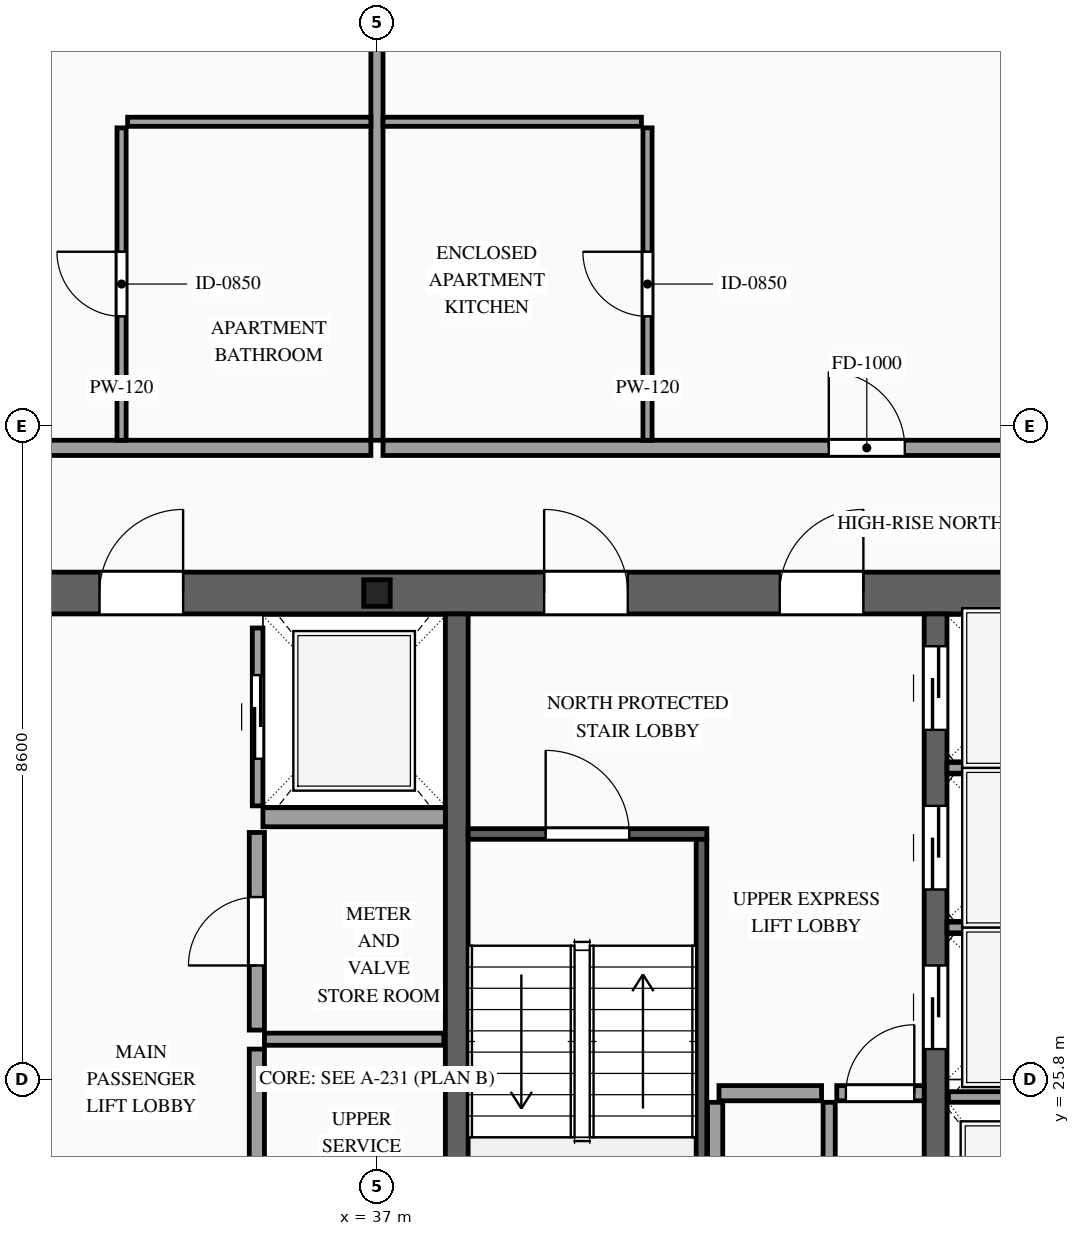
"""IFC4 building model, lengths in metres.
Left out: names, types, materials, properties, quantities, classifications, styles, units other than length and angle.
Written with IfcOpenShell. Run it as: python <this file> out.ifc"""

import sys

from ifc_helpers import new_model, si_unit, direction, frame, frame_2d, origin, origin_2d, place, context, subcontext, project, spatial, rectangle, i_section, extrude, source, transform, mapped, element, fill, save


model = new_model("IFC4")
c1 = context("Model", 3, precision=1e-05, world=origin(), true_north=direction((0.0, 1.0)))
c2 = subcontext(c1, "Body", "Model", "MODEL_VIEW")
j1 = project(units=[si_unit("LENGTHUNIT", "METRE"), si_unit("PLANEANGLEUNIT", "RADIAN")], contexts=[c1])
p1 = place(None, origin())
s1 = spatial("IfcSite", under=j1, at=p1, CompositionType="ELEMENT")
p2 = place(p1, origin())
s2 = spatial("IfcBuilding", under=s1, at=p2, CompositionType="ELEMENT")
p3 = place(p2, frame((0.0, 0.0, 275.1)))
s3 = spatial("IfcBuildingStorey", under=s2, at=p3, CompositionType="ELEMENT", Elevation=275.1)
p4 = place(p3, frame((23.525, 32.2, 0.0), z_axis=(0.0, 0.0, 1.0), x_axis=(1.0, 0.0, 0.0)))
e1 = element("IfcWall", 1, at=p4, inside=s3, PredefinedType="SHEAR", context=c2, shape_type="SweptSolid", body=[
    extrude(rectangle(XDim=26.95, YDim=0.55, at=frame_2d((13.475, 0.0))), origin(), (0.0, 0.0, 1.0), 3.5),
])
p5 = place(p4, frame((4.545, 0.0, 0.0)))
e2 = element("IfcOpeningElement", 2, at=p5, cuts=e1, PredefinedType="OPENING", context=c2, shape_type="SweptSolid", body=[
    extrude(rectangle(XDim=0.9, YDim=2.15, at=frame_2d((0.45, 1.075))), frame((0.0, 0.29, 0.0), z_axis=(0.0, -1.0, 0.0), x_axis=(1.0, 0.0, 0.0)), (0.0, 0.0, 1.0), 0.58),
])
p6 = place(p4, frame((9.825, 0.0, 0.0)))
e3 = element("IfcOpeningElement", 3, at=p6, cuts=e1, PredefinedType="OPENING", context=c2, shape_type="SweptSolid", body=[
    extrude(rectangle(XDim=1.1, YDim=2.2, at=frame_2d((0.55, 1.1))), frame((0.0, 0.29, 0.0), z_axis=(0.0, -1.0, 0.0), x_axis=(1.0, 0.0, 0.0)), (0.0, 0.0, 1.0), 0.58),
])
p7 = place(p4, frame((15.675, 0.0, 0.0)))
e4 = element("IfcOpeningElement", 4, at=p7, cuts=e1, PredefinedType="OPENING", context=c2, shape_type="SweptSolid", body=[
    extrude(rectangle(XDim=1.1, YDim=2.2, at=frame_2d((0.55, 1.1))), frame((0.0, 0.29, 0.0), z_axis=(0.0, -1.0, 0.0), x_axis=(1.0, 0.0, 0.0)), (0.0, 0.0, 1.0), 0.58),
])
p8 = place(p4, frame((18.775, 0.0, 0.0)))
e5 = element("IfcOpeningElement", 5, at=p8, cuts=e1, PredefinedType="OPENING", context=c2, shape_type="SweptSolid", body=[
    extrude(rectangle(XDim=1.1, YDim=2.2, at=frame_2d((0.55, 1.1))), frame((0.0, 0.29, 0.0), z_axis=(0.0, -1.0, 0.0), x_axis=(1.0, 0.0, 0.0)), (0.0, 0.0, 1.0), 0.58),
])
m1 = source(origin(), c2, "Body", "SweptSolid", [
    extrude(rectangle(XDim=12.25, YDim=0.3, at=frame_2d((6.125, 0.0))), origin(), (0.0, 0.0, 1.0), 3.5),
])
p9 = place(p3, frame((38.05, 19.675, 0.0), z_axis=(0.0, 0.0, 1.0), x_axis=(0.0, 1.0, 0.0)))
e6 = element("IfcWall", 6, at=p9, inside=s3, PredefinedType="SOLIDWALL", context=c2, shape_type="MappedRepresentation", body=[
    mapped(m1, transform((0.0, 0.0, 0.0), scale=1.0)),
])
p10 = place(p3, frame((44.35, 19.675, 0.0), z_axis=(0.0, 0.0, 1.0), x_axis=(0.0, 1.0, 0.0)))
e7 = element("IfcWall", 7, at=p10, inside=s3, PredefinedType="SOLIDWALL", context=c2, shape_type="SweptSolid", body=[
    extrude(rectangle(XDim=12.25, YDim=0.3, at=frame_2d((6.125, 0.0))), origin(), (0.0, 0.0, 1.0), 3.5),
])
p11 = place(p10, frame((6.525, 0.0, 0.0)))
e8 = element("IfcOpeningElement", 8, at=p11, cuts=e7, PredefinedType="OPENING", context=c2, shape_type="SweptSolid", body=[
    extrude(rectangle(XDim=1.1, YDim=2.2, at=frame_2d((0.55, 1.1))), frame((0.0, 0.165, 0.0), z_axis=(0.0, -1.0, 0.0), x_axis=(1.0, 0.0, 0.0)), (0.0, 0.0, 1.0), 0.33),
])
p12 = place(p10, frame((8.625, 0.0, 0.0)))
e9 = element("IfcOpeningElement", 9, at=p12, cuts=e7, PredefinedType="OPENING", context=c2, shape_type="SweptSolid", body=[
    extrude(rectangle(XDim=1.1, YDim=2.2, at=frame_2d((0.55, 1.1))), frame((0.0, 0.165, 0.0), z_axis=(0.0, -1.0, 0.0), x_axis=(1.0, 0.0, 0.0)), (0.0, 0.0, 1.0), 0.33),
])
p13 = place(p10, frame((10.725, 0.0, 0.0)))
e10 = element("IfcOpeningElement", 10, at=p13, cuts=e7, PredefinedType="OPENING", context=c2, shape_type="SweptSolid", body=[
    extrude(rectangle(XDim=1.1, YDim=2.2, at=frame_2d((0.55, 1.1))), frame((0.0, 0.165, 0.0), z_axis=(0.0, -1.0, 0.0), x_axis=(1.0, 0.0, 0.0)), (0.0, 0.0, 1.0), 0.33),
])
m2 = source(origin(), c2, "Body", "SweptSolid", [
    extrude(i_section(OverallWidth=0.35, OverallDepth=0.35, WebThickness=0.012, FlangeThickness=0.019, at=origin_2d()), origin(), (0.0, 0.0, 1.0), 3.5),
])
p14 = place(p3, frame((37.0, 32.2, 0.0), z_axis=(0.0, 0.0, 1.0), x_axis=(1.0, 0.0, 0.0)))
e11 = element("IfcColumn", 11, at=p14, inside=s3, PredefinedType="COLUMN", context=c2, shape_type="MappedRepresentation", body=[
    mapped(m2, transform((0.0, 0.0, 0.0), scale=1.0)),
])
m3 = source(origin(), c2, "Body", "SweptSolid", [
    extrude(rectangle(XDim=1.92, YDim=0.14, at=frame_2d((0.96, 0.0))), origin(), (0.0, 0.0, 1.0), 3.28),
])
p15 = place(p3, frame((44.52, 25.57, 0.0), z_axis=(0.0, 0.0, 1.0), x_axis=(1.0, 0.0, 0.0)))
e12 = element("IfcWall", 12, at=p15, inside=s3, PredefinedType="SOLIDWALL", context=c2, shape_type="MappedRepresentation", body=[
    mapped(m3, transform((0.0, 0.0, 0.0), scale=1.0)),
])
p16 = place(p3, frame((35.43, 29.4, 0.0), z_axis=(0.0, 0.0, 1.0), x_axis=(0.0, 1.0, 0.0)))
e13 = element("IfcWall", 13, at=p16, inside=s3, PredefinedType="SOLIDWALL", context=c2, shape_type="SweptSolid", body=[
    extrude(rectangle(XDim=2.34, YDim=0.14, at=frame_2d((1.17, 0.0))), origin(), (0.0, 0.0, 1.0), 3.28),
])
p17 = place(p16, frame((0.62, 0.0, 0.0)))
e14 = element("IfcOpeningElement", 14, at=p17, cuts=e13, PredefinedType="OPENING", context=c2, shape_type="SweptSolid", body=[
    extrude(rectangle(XDim=1.1, YDim=2.2, at=frame_2d((0.55, 1.1))), frame((0.0, 0.085, 0.0), z_axis=(0.0, -1.0, 0.0), x_axis=(1.0, 0.0, 0.0)), (0.0, 0.0, 1.0), 0.17),
])
m4 = source(origin(), c2, "Body", "SweptSolid", [
    extrude(rectangle(XDim=2.4, YDim=0.25, at=frame_2d((1.2, 0.0))), origin(), (0.0, 0.0, 1.0), 3.28),
])
p18 = place(p3, frame((35.5, 29.25, 0.0), z_axis=(0.0, 0.0, 1.0), x_axis=(1.0, 0.0, 0.0)))
e15 = element("IfcWall", 15, at=p18, inside=s3, PredefinedType="SOLIDWALL", context=c2, shape_type="MappedRepresentation", body=[
    mapped(m4, transform((0.0, 0.0, 0.0), scale=1.0)),
])
m5 = source(origin(), c2, "Body", "SweptSolid", [
    extrude(rectangle(XDim=2.0, YDim=0.14, at=frame_2d((1.0, 0.0))), origin(), (0.0, 0.0, 1.0), 3.28),
])
for number, where, z_axis, x_axis in (
    (16, (44.5, 27.8, 0.0), (0.0, 0.0, 1.0), (1.0, 0.0, 0.0)),
    (17, (44.5, 29.9, 0.0), (0.0, 0.0, 1.0), (1.0, 0.0, 0.0)),
):
    element("IfcWall", number, at=place(p3, frame(where, z_axis=z_axis, x_axis=x_axis)), inside=s3, PredefinedType="SOLIDWALL", context=c2, shape_type="MappedRepresentation", body=[
        mapped(m5, transform((0.0, 0.0, 0.0), scale=1.0)),
    ])
p19 = place(p3, frame((38.2, 29.03, 0.0), z_axis=(0.0, 0.0, 1.0), x_axis=(1.0, 0.0, 0.0)))
e18 = element("IfcWall", 18, at=p19, inside=s3, PredefinedType="SOLIDWALL", context=c2, shape_type="SweptSolid", body=[
    extrude(rectangle(XDim=3.14, YDim=0.14, at=frame_2d((1.57, 0.0))), origin(), (0.0, 0.0, 1.0), 3.28),
])
p20 = place(p19, frame((1.02, 0.0, 0.0)))
e19 = element("IfcOpeningElement", 19, at=p20, cuts=e18, PredefinedType="OPENING", context=c2, shape_type="SweptSolid", body=[
    extrude(rectangle(XDim=1.1, YDim=2.2, at=frame_2d((0.55, 1.1))), frame((0.0, 0.085, 0.0), z_axis=(0.0, -1.0, 0.0), x_axis=(1.0, 0.0, 0.0)), (0.0, 0.0, 1.0), 0.17),
])
m6 = source(origin(), c2, "Body", "SweptSolid", [
    extrude(rectangle(XDim=8.94, YDim=0.14, at=frame_2d((4.47, 0.0))), origin(), (0.0, 0.0, 1.0), 3.28),
])
p21 = place(p3, frame((41.27, 20.02, 0.0), z_axis=(0.0, 0.0, 1.0), x_axis=(0.0, 1.0, 0.0)))
e20 = element("IfcWall", 20, at=p21, inside=s3, PredefinedType="SOLIDWALL", context=c2, shape_type="MappedRepresentation", body=[
    mapped(m6, transform((0.0, 0.0, 0.0), scale=1.0)),
])
p22 = place(p3, frame((35.42, 19.86, 0.0), z_axis=(0.0, 0.0, 1.0), x_axis=(0.0, 1.0, 0.0)))
e21 = element("IfcWall", 21, at=p22, inside=s3, PredefinedType="PARTITIONING", context=c2, shape_type="SweptSolid", body=[
    extrude(rectangle(XDim=6.34, YDim=0.2, at=frame_2d((3.17, 0.0))), origin(), (0.0, 0.0, 1.0), 3.28),
])
p23 = place(p22, frame((2.72, 0.0, 0.0)))
e22 = element("IfcOpeningElement", 22, at=p23, cuts=e21, PredefinedType="OPENING", context=c2, shape_type="SweptSolid", body=[
    extrude(rectangle(XDim=0.9, YDim=2.15, at=frame_2d((0.45, 1.075))), frame((0.0, 0.115, 0.0), z_axis=(0.0, -1.0, 0.0), x_axis=(1.0, 0.0, 0.0)), (0.0, 0.0, 1.0), 0.23),
])
p24 = place(p3, frame((35.42, 26.45, 0.0), z_axis=(0.0, 0.0, 1.0), x_axis=(0.0, 1.0, 0.0)))
e23 = element("IfcWall", 23, at=p24, inside=s3, PredefinedType="PARTITIONING", context=c2, shape_type="SweptSolid", body=[
    extrude(rectangle(XDim=2.6, YDim=0.2, at=frame_2d((1.3, 0.0))), origin(), (0.0, 0.0, 1.0), 3.28),
])
p25 = place(p24, frame((0.85, 0.0, 0.0)))
e24 = element("IfcOpeningElement", 24, at=p25, cuts=e23, PredefinedType="OPENING", context=c2, shape_type="SweptSolid", body=[
    extrude(rectangle(XDim=0.9, YDim=2.15, at=frame_2d((0.45, 1.075))), frame((0.0, 0.115, 0.0), z_axis=(0.0, -1.0, 0.0), x_axis=(1.0, 0.0, 0.0)), (0.0, 0.0, 1.0), 0.23),
])
m7 = source(origin(), c2, "Body", "SweptSolid", [
    extrude(rectangle(XDim=2.36, YDim=0.16, at=frame_2d((1.18, 0.0))), origin(), (0.0, 0.0, 1.0), 3.28),
])
p26 = place(p3, frame((35.52, 26.33, 0.0), z_axis=(0.0, 0.0, 1.0), x_axis=(1.0, 0.0, 0.0)))
e25 = element("IfcWall", 25, at=p26, inside=s3, PredefinedType="PARTITIONING", context=c2, shape_type="MappedRepresentation", body=[
    mapped(m7, transform((0.0, 0.0, 0.0), scale=1.0)),
])
m8 = source(origin(), c2, "Body", "SweptSolid", [
    extrude(rectangle(XDim=6.06, YDim=0.2, at=frame_2d((3.03, 0.0))), origin(), (0.0, 0.0, 1.0), 3.28),
])
p27 = place(p3, frame((41.45, 19.44, 0.0), z_axis=(0.0, 0.0, 1.0), x_axis=(0.0, 1.0, 0.0)))
e26 = element("IfcWall", 26, at=p27, inside=s3, PredefinedType="PARTITIONING", context=c2, shape_type="MappedRepresentation", body=[
    mapped(m8, transform((0.0, 0.0, 0.0), scale=1.0)),
])
m9 = source(origin(), c2, "Body", "SweptSolid", [
    extrude(rectangle(XDim=1.35, YDim=0.2, at=frame_2d((0.675, 0.0))), origin(), (0.0, 0.0, 1.0), 3.28),
])
p28 = place(p3, frame((41.5, 25.62, 0.0), z_axis=(0.0, 0.0, 1.0), x_axis=(1.0, 0.0, 0.0)))
e27 = element("IfcWall", 27, at=p28, inside=s3, PredefinedType="PARTITIONING", context=c2, shape_type="MappedRepresentation", body=[
    mapped(m9, transform((0.0, 0.0, 0.0), scale=1.0)),
])
m10 = source(origin(), c2, "Body", "SweptSolid", [
    extrude(rectangle(XDim=4.06, YDim=0.16, at=frame_2d((2.03, 0.0))), origin(), (0.0, 0.0, 1.0), 3.28),
])
p29 = place(p3, frame((42.95, 21.44, 0.0), z_axis=(0.0, 0.0, 1.0), x_axis=(0.0, 1.0, 0.0)))
e28 = element("IfcWall", 28, at=p29, inside=s3, PredefinedType="PARTITIONING", context=c2, shape_type="MappedRepresentation", body=[
    mapped(m10, transform((0.0, 0.0, 0.0), scale=1.0)),
])
p30 = place(p3, frame((43.05, 25.62, 0.0), z_axis=(0.0, 0.0, 1.0), x_axis=(1.0, 0.0, 0.0)))
e29 = element("IfcWall", 29, at=p30, inside=s3, PredefinedType="PARTITIONING", context=c2, shape_type="SweptSolid", body=[
    extrude(rectangle(XDim=1.15, YDim=0.2, at=frame_2d((0.575, 0.0))), origin(), (0.0, 0.0, 1.0), 3.28),
])
p31 = place(p30, frame((0.12, 0.0, 0.0)))
e30 = element("IfcOpeningElement", 30, at=p31, cuts=e29, PredefinedType="OPENING", context=c2, shape_type="SweptSolid", body=[
    extrude(rectangle(XDim=0.9, YDim=2.15, at=frame_2d((0.45, 1.075))), frame((0.0, 0.115, 0.0), z_axis=(0.0, -1.0, 0.0), x_axis=(1.0, 0.0, 0.0)), (0.0, 0.0, 1.0), 0.23),
])
p32 = place(p3, frame((19.44, 34.11, 0.0), z_axis=(0.0, 0.0, 1.0), x_axis=(1.0, 0.0, 0.0)))
e31 = element("IfcWall", 31, at=p32, inside=s3, PredefinedType="PARTITIONING", context=c2, shape_type="SweptSolid", body=[
    extrude(rectangle(XDim=17.48, YDim=0.2, at=frame_2d((8.74, 0.0))), origin(), (0.0, 0.0, 1.0), 3.28),
])
p33 = place(p32, frame((8.34, 0.0, 0.0)))
e32 = element("IfcOpeningElement", 32, at=p33, cuts=e31, PredefinedType="OPENING", context=c2, shape_type="SweptSolid", body=[
    extrude(rectangle(XDim=1.0, YDim=2.2, at=frame_2d((0.5, 1.1))), frame((0.0, 0.115, 0.0), z_axis=(0.0, -1.0, 0.0), x_axis=(1.0, 0.0, 0.0)), (0.0, 0.0, 1.0), 0.23),
])
m11 = source(origin(), c2, "Body", "SweptSolid", [
    extrude(rectangle(XDim=12.04, YDim=0.16, at=frame_2d((6.02, 0.0))), origin(), (0.0, 0.0, 1.0), 2.787),
])
p34 = place(p3, frame((37.0, 34.21, 0.0), z_axis=(0.0, 0.0, 1.0), x_axis=(0.0, 1.0, 0.0)))
e33 = element("IfcWall", 33, at=p34, inside=s3, PredefinedType="PARTITIONING", context=c2, shape_type="MappedRepresentation", body=[
    mapped(m11, transform((0.0, 0.0, 0.0), scale=1.0)),
])
m12 = source(origin(), c2, "Body", "SweptSolid", [
    extrude(rectangle(XDim=3.2, YDim=0.12, at=frame_2d((1.6, 0.0))), origin(), (0.0, 0.0, 1.0), 3.28),
])
p35 = place(p3, frame((33.72, 38.4, 0.0), z_axis=(0.0, 0.0, 1.0), x_axis=(1.0, 0.0, 0.0)))
e34 = element("IfcWall", 34, at=p35, inside=s3, PredefinedType="PARTITIONING", context=c2, shape_type="MappedRepresentation", body=[
    mapped(m12, transform((0.0, 0.0, 0.0), scale=1.0)),
])
p36 = place(p3, frame((33.64, 34.21, 0.0), z_axis=(0.0, 0.0, 1.0), x_axis=(0.0, 1.0, 0.0)))
e35 = element("IfcWall", 35, at=p36, inside=s3, PredefinedType="PARTITIONING", context=c2, shape_type="SweptSolid", body=[
    extrude(rectangle(XDim=4.11, YDim=0.12, at=frame_2d((2.055, 0.0))), origin(), (0.0, 0.0, 1.0), 3.28),
])
p37 = place(p36, frame((1.63, 0.0, 0.0)))
e36 = element("IfcOpeningElement", 36, at=p37, cuts=e35, PredefinedType="OPENING", context=c2, shape_type="SweptSolid", body=[
    extrude(rectangle(XDim=0.85, YDim=2.1, at=frame_2d((0.425, 1.05))), frame((0.0, 0.075, 0.0), z_axis=(0.0, -1.0, 0.0), x_axis=(1.0, 0.0, 0.0)), (0.0, 0.0, 1.0), 0.15),
])
p38 = place(p3, frame((37.08, 34.11, 0.0), z_axis=(0.0, 0.0, 1.0), x_axis=(1.0, 0.0, 0.0)))
e37 = element("IfcWall", 37, at=p38, inside=s3, PredefinedType="PARTITIONING", context=c2, shape_type="SweptSolid", body=[
    extrude(rectangle(XDim=17.48, YDim=0.2, at=frame_2d((8.74, 0.0))), origin(), (0.0, 0.0, 1.0), 3.28),
])
p39 = place(p38, frame((5.865, 0.0, 0.0)))
e38 = element("IfcOpeningElement", 38, at=p39, cuts=e37, PredefinedType="OPENING", context=c2, shape_type="SweptSolid", body=[
    extrude(rectangle(XDim=1.0, YDim=2.2, at=frame_2d((0.5, 1.1))), frame((0.0, 0.115, 0.0), z_axis=(0.0, -1.0, 0.0), x_axis=(1.0, 0.0, 0.0)), (0.0, 0.0, 1.0), 0.23),
])
m13 = source(origin(), c2, "Body", "SweptSolid", [
    extrude(rectangle(XDim=3.4, YDim=0.12, at=frame_2d((1.7, 0.0))), origin(), (0.0, 0.0, 1.0), 3.28),
])
p40 = place(p3, frame((37.08, 38.4, 0.0), z_axis=(0.0, 0.0, 1.0), x_axis=(1.0, 0.0, 0.0)))
e39 = element("IfcWall", 39, at=p40, inside=s3, PredefinedType="PARTITIONING", context=c2, shape_type="MappedRepresentation", body=[
    mapped(m13, transform((0.0, 0.0, 0.0), scale=1.0)),
])
p41 = place(p3, frame((40.56, 34.21, 0.0), z_axis=(0.0, 0.0, 1.0), x_axis=(0.0, 1.0, 0.0)))
e40 = element("IfcWall", 40, at=p41, inside=s3, PredefinedType="PARTITIONING", context=c2, shape_type="SweptSolid", body=[
    extrude(rectangle(XDim=4.11, YDim=0.12, at=frame_2d((2.055, 0.0))), origin(), (0.0, 0.0, 1.0), 3.28),
])
p42 = place(p41, frame((1.63, 0.0, 0.0)))
e41 = element("IfcOpeningElement", 41, at=p42, cuts=e40, PredefinedType="OPENING", context=c2, shape_type="SweptSolid", body=[
    extrude(rectangle(XDim=0.85, YDim=2.1, at=frame_2d((0.425, 1.05))), frame((0.0, 0.075, 0.0), z_axis=(0.0, -1.0, 0.0), x_axis=(1.0, 0.0, 0.0)), (0.0, 0.0, 1.0), 0.15),
])
m14 = source(origin(), c2, "Body", "SweptSolid", [
    extrude(rectangle(XDim=1.1, YDim=2.2, at=frame_2d((0.55, 1.1))), frame((0.0, 0.025, 0.0), z_axis=(0.0, -1.0, 0.0), x_axis=(1.0, 0.0, 0.0)), (0.0, 0.0, 1.0), 0.05),
])
p43 = place(p17, origin())
e42 = element("IfcDoor", 42, at=p43, inside=s3, OperationType="SLIDING_TO_RIGHT", PredefinedType="DOOR", context=c2, shape_type="MappedRepresentation", body=[
    mapped(m14, transform((0.0, 0.0, 0.0), scale=1.0)),
])
fill(e14, e42)
p44 = place(p11, origin())
e43 = element("IfcDoor", 43, at=p44, inside=s3, OperationType="SLIDING_TO_LEFT", PredefinedType="DOOR", context=c2, shape_type="MappedRepresentation", body=[
    mapped(m14, transform((0.0, 0.0, 0.0), scale=1.0)),
])
fill(e8, e43)
p45 = place(p12, origin())
e44 = element("IfcDoor", 44, at=p45, inside=s3, OperationType="SLIDING_TO_RIGHT", PredefinedType="DOOR", context=c2, shape_type="MappedRepresentation", body=[
    mapped(m14, transform((0.0, 0.0, 0.0), scale=1.0)),
])
fill(e9, e44)
p46 = place(p13, origin())
e45 = element("IfcDoor", 45, at=p46, inside=s3, OperationType="SLIDING_TO_LEFT", PredefinedType="DOOR", context=c2, shape_type="MappedRepresentation", body=[
    mapped(m14, transform((0.0, 0.0, 0.0), scale=1.0)),
])
fill(e10, e45)
m15 = source(origin(), c2, "Body", "SweptSolid", [
    extrude(rectangle(XDim=1.1, YDim=2.2, at=frame_2d((0.55, 1.1))), frame((0.0, 0.025, 0.0), z_axis=(0.0, -1.0, 0.0), x_axis=(1.0, 0.0, 0.0)), (0.0, 0.0, 1.0), 0.05),
])
p47 = place(p20, origin())
e46 = element("IfcDoor", 46, at=p47, inside=s3, OperationType="SINGLE_SWING_LEFT", PredefinedType="DOOR", context=c2, shape_type="MappedRepresentation", body=[
    mapped(m15, transform((0.0, 0.0, 0.0), scale=1.0)),
])
fill(e19, e46)
p48 = place(p6, origin())
e47 = element("IfcDoor", 47, at=p48, inside=s3, OperationType="SINGLE_SWING_RIGHT", PredefinedType="DOOR", context=c2, shape_type="MappedRepresentation", body=[
    mapped(m15, transform((0.0, 0.0, 0.0), scale=1.0)),
])
fill(e3, e47)
p49 = place(p7, origin())
e48 = element("IfcDoor", 48, at=p49, inside=s3, OperationType="SINGLE_SWING_LEFT", PredefinedType="DOOR", context=c2, shape_type="MappedRepresentation", body=[
    mapped(m15, transform((0.0, 0.0, 0.0), scale=1.0)),
])
fill(e4, e48)
p50 = place(p8, origin())
e49 = element("IfcDoor", 49, at=p50, inside=s3, OperationType="SINGLE_SWING_RIGHT", PredefinedType="DOOR", context=c2, shape_type="MappedRepresentation", body=[
    mapped(m15, transform((0.0, 0.0, 0.0), scale=1.0)),
])
fill(e5, e49)
m16 = source(origin(), c2, "Body", "SweptSolid", [
    extrude(rectangle(XDim=0.9, YDim=2.15, at=frame_2d((0.45, 1.075))), frame((0.0, 0.025, 0.0), z_axis=(0.0, -1.0, 0.0), x_axis=(1.0, 0.0, 0.0)), (0.0, 0.0, 1.0), 0.05),
])
p51 = place(p25, origin())
e50 = element("IfcDoor", 50, at=p51, inside=s3, OperationType="SINGLE_SWING_LEFT", PredefinedType="DOOR", context=c2, shape_type="MappedRepresentation", body=[
    mapped(m16, transform((0.0, 0.0, 0.0), scale=1.0)),
])
fill(e24, e50)
p52 = place(p31, origin())
e51 = element("IfcDoor", 51, at=p52, inside=s3, OperationType="SINGLE_SWING_RIGHT", PredefinedType="DOOR", context=c2, shape_type="MappedRepresentation", body=[
    mapped(m16, transform((0.0, 0.0, 0.0), scale=1.0)),
])
fill(e30, e51)
m17 = source(origin(), c2, "Body", "SweptSolid", [
    extrude(rectangle(XDim=0.85, YDim=2.1, at=frame_2d((0.425, 1.05))), frame((0.0, 0.025, 0.0), z_axis=(0.0, -1.0, 0.0), x_axis=(1.0, 0.0, 0.0)), (0.0, 0.0, 1.0), 0.05),
])
p53 = place(p37, origin())
e52 = element("IfcDoor", 52, at=p53, inside=s3, OperationType="SINGLE_SWING_RIGHT", PredefinedType="DOOR", context=c2, shape_type="MappedRepresentation", body=[
    mapped(m17, transform((0.0, 0.0, 0.0), scale=1.0)),
])
fill(e36, e52)
m18 = source(origin(), c2, "Body", "SweptSolid", [
    extrude(rectangle(XDim=1.0, YDim=2.2, at=frame_2d((0.5, 1.1))), frame((0.0, 0.025, 0.0), z_axis=(0.0, -1.0, 0.0), x_axis=(1.0, 0.0, 0.0)), (0.0, 0.0, 1.0), 0.05),
])
p54 = place(p39, origin())
e53 = element("IfcDoor", 53, at=p54, inside=s3, OperationType="SINGLE_SWING_LEFT", PredefinedType="DOOR", context=c2, shape_type="MappedRepresentation", body=[
    mapped(m18, transform((0.0, 0.0, 0.0), scale=1.0)),
])
fill(e38, e53)
p55 = place(p42, origin())
e54 = element("IfcDoor", 54, at=p55, inside=s3, OperationType="SINGLE_SWING_RIGHT", PredefinedType="DOOR", context=c2, shape_type="MappedRepresentation", body=[
    mapped(m17, transform((0.0, 0.0, 0.0), scale=1.0)),
])
fill(e41, e54)
save(model, sys.argv[1])
